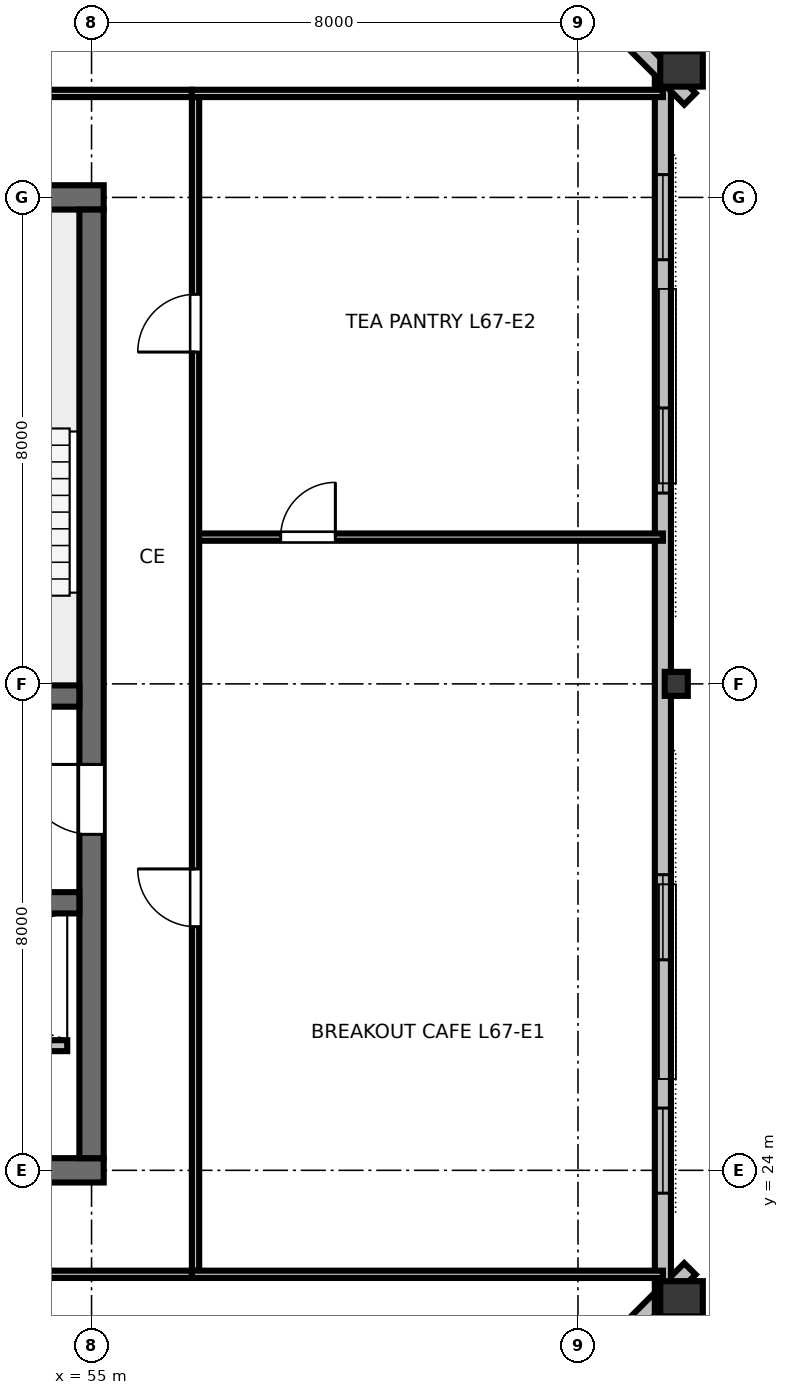
"""IFC4 building model, lengths in metres.
Left out: names, types, materials, properties, quantities, classifications, styles, units other than length and angle.
Written with IfcOpenShell. Run it as: python <this file> out.ifc"""

import sys

from ifc_helpers import new_model, si_unit, direction, frame, frame_2d, origin, origin_2d, place, context, subcontext, project, spatial, rectangle, hollow_rectangle, i_section, extrude, element, fill, save


model = new_model("IFC4")
c1 = context("Model", 3, precision=1e-05, world=origin(), true_north=direction((0.0, 1.0)))
c2 = subcontext(c1, "Body", "Model", "MODEL_VIEW")
j1 = project(units=[si_unit("LENGTHUNIT", "METRE"), si_unit("PLANEANGLEUNIT", "RADIAN")], contexts=[c1])
p1 = place(None, origin())
s1 = spatial("IfcSite", under=j1, at=p1, CompositionType="ELEMENT")
p2 = place(p1, origin())
s2 = spatial("IfcBuilding", under=s1, at=p2, CompositionType="ELEMENT")
p3 = place(p2, frame((0.0, 0.0, 253.8)))
s3 = spatial("IfcBuildingStorey", under=s2, at=p3, CompositionType="ELEMENT", Elevation=253.8)
p4 = place(p3, frame((36.8, 24.0, 0.0), z_axis=(0.0, 0.0, 1.0), x_axis=(1.0, 0.0, 0.0)))
e1 = element("IfcWall", 1, at=p4, inside=s3, PredefinedType="SHEAR", context=c2, shape_type="SweptSolid", body=[
    extrude(rectangle(XDim=18.4, YDim=0.4, at=frame_2d((9.2, 0.0))), origin(), (0.0, 0.0, 1.0), 3.36),
])
p5 = place(p4, frame((13.4, 0.0, 0.0)))
e2 = element("IfcOpeningElement", 2, at=p5, cuts=e1, PredefinedType="OPENING", context=c2, shape_type="SweptSolid", body=[
    extrude(rectangle(XDim=1.6, YDim=2.15, at=frame_2d((0.8, 1.075))), frame((0.0, 0.21, 0.0), z_axis=(0.0, -1.0, 0.0), x_axis=(1.0, 0.0, 0.0)), (0.0, 0.0, 1.0), 0.42),
])
p6 = place(p3, frame((36.8, 40.0, 0.0), z_axis=(0.0, 0.0, 1.0), x_axis=(1.0, 0.0, 0.0)))
e3 = element("IfcWall", 3, at=p6, inside=s3, PredefinedType="SHEAR", context=c2, shape_type="SweptSolid", body=[
    extrude(rectangle(XDim=18.4, YDim=0.4, at=frame_2d((9.2, 0.0))), origin(), (0.0, 0.0, 1.0), 3.36),
])
p7 = place(p6, frame((8.7, 0.0, 0.0)))
e4 = element("IfcOpeningElement", 4, at=p7, cuts=e3, PredefinedType="OPENING", context=c2, shape_type="SweptSolid", body=[
    extrude(rectangle(XDim=1.0, YDim=2.15, at=frame_2d((0.5, 1.075))), frame((0.0, 0.21, 0.0), z_axis=(0.0, -1.0, 0.0), x_axis=(1.0, 0.0, 0.0)), (0.0, 0.0, 1.0), 0.42),
])
p8 = place(p3, frame((55.0, 24.2, 0.0), z_axis=(0.0, 0.0, 1.0), x_axis=(0.0, 1.0, 0.0)))
e5 = element("IfcWall", 5, at=p8, inside=s3, PredefinedType="SHEAR", context=c2, shape_type="SweptSolid", body=[
    extrude(rectangle(XDim=15.6, YDim=0.4, at=frame_2d((7.8, 0.0))), origin(), (0.0, 0.0, 1.0), 3.36),
])
p9 = place(p8, frame((5.325, 0.0, 0.0)))
e6 = element("IfcOpeningElement", 6, at=p9, cuts=e5, PredefinedType="OPENING", context=c2, shape_type="SweptSolid", body=[
    extrude(rectangle(XDim=1.15, YDim=2.15, at=frame_2d((0.575, 1.075))), frame((0.0, 0.21, 0.0), z_axis=(0.0, -1.0, 0.0), x_axis=(1.0, 0.0, 0.0)), (0.0, 0.0, 1.0), 0.42),
])
p10 = place(p3, frame((37.2, 31.8, 0.0), z_axis=(0.0, 0.0, 1.0), x_axis=(1.0, 0.0, 0.0)))
e7 = element("IfcWall", 7, at=p10, inside=s3, PredefinedType="SHEAR", context=c2, shape_type="SweptSolid", body=[
    extrude(rectangle(XDim=17.6, YDim=0.35, at=frame_2d((8.8, 0.0))), origin(), (0.0, 0.0, 1.0), 3.36),
])
p11 = place(p10, frame((0.85, 0.0, 0.0)))
e8 = element("IfcOpeningElement", 8, at=p11, cuts=e7, PredefinedType="OPENING", context=c2, shape_type="SweptSolid", body=[
    extrude(rectangle(XDim=1.1, YDim=2.15, at=frame_2d((0.55, 1.075))), frame((0.0, 0.185, 0.0), z_axis=(0.0, -1.0, 0.0), x_axis=(1.0, 0.0, 0.0)), (0.0, 0.0, 1.0), 0.37),
])
p12 = place(p10, frame((14.75, 0.0, 0.0)))
e9 = element("IfcOpeningElement", 9, at=p12, cuts=e7, PredefinedType="OPENING", context=c2, shape_type="SweptSolid", body=[
    extrude(rectangle(XDim=1.1, YDim=2.15, at=frame_2d((0.55, 1.075))), frame((0.0, 0.185, 0.0), z_axis=(0.0, -1.0, 0.0), x_axis=(1.0, 0.0, 0.0)), (0.0, 0.0, 1.0), 0.37),
])
p13 = place(p3, frame((37.2, 28.4, 0.0), z_axis=(0.0, 0.0, 1.0), x_axis=(1.0, 0.0, 0.0)))
e10 = element("IfcWall", 10, at=p13, inside=s3, PredefinedType="SHEAR", context=c2, shape_type="SweptSolid", body=[
    extrude(rectangle(XDim=17.6, YDim=0.35, at=frame_2d((8.8, 0.0))), origin(), (0.0, 0.0, 1.0), 3.36),
])
p14 = place(p3, frame((64.703, 21.888, 0.0), z_axis=(0.0, 0.0, 1.0), x_axis=(0.0, 1.0, 0.0)))
e11 = element("IfcColumn", 11, at=p14, inside=s3, PredefinedType="COLUMN", context=c2, shape_type="SweptSolid", body=[
    extrude(hollow_rectangle(XDim=0.58, YDim=0.7, WallThickness=0.032, at=origin_2d()), origin(), (0.0, 0.0, 1.0), 3.373),
])
p15 = place(p3, frame((64.616, 32.0, 0.0), z_axis=(0.0, 0.0, 1.0), x_axis=(0.0, 1.0, 0.0)))
e12 = element("IfcColumn", 12, at=p15, inside=s3, PredefinedType="COLUMN", context=c2, shape_type="SweptSolid", body=[
    extrude(i_section(OverallWidth=0.395, OverallDepth=0.38, WebThickness=0.019, FlangeThickness=0.03, FilletRadius=0.025, at=origin_2d()), origin(), (0.0, 0.0, 1.0), 3.373),
])
p16 = place(p3, frame((64.703, 42.112, 0.0), z_axis=(0.0, 0.0, 1.0), x_axis=(0.0, 1.0, 0.0)))
e13 = element("IfcColumn", 13, at=p16, inside=s3, PredefinedType="COLUMN", context=c2, shape_type="SweptSolid", body=[
    extrude(hollow_rectangle(XDim=0.58, YDim=0.7, WallThickness=0.032, at=origin_2d()), origin(), (0.0, 0.0, 1.0), 3.373),
])
p17 = place(p3, frame((57.193, 14.731, 0.0), z_axis=(0.0, 0.0, 1.0), x_axis=(0.707106781187, 0.707106781187, 0.0)))
e14 = element("IfcWall", 14, at=p17, inside=s3, PredefinedType="STANDARD", context=c2, shape_type="SweptSolid", body=[
    extrude(rectangle(XDim=10.816, YDim=0.265, at=frame_2d((5.408, 0.0))), origin(), (0.0, 0.0, 1.0), 2.832),
])
p18 = place(p3, frame((64.396, 21.305, 0.0), z_axis=(0.0, 0.0, 1.0), x_axis=(0.0, 1.0, 0.0)))
e15 = element("IfcWall", 15, at=p18, inside=s3, PredefinedType="STANDARD", context=c2, shape_type="SweptSolid", body=[
    extrude(rectangle(XDim=21.389, YDim=0.265, at=frame_2d((10.695, 0.0))), origin(), (0.0, 0.0, 1.0), 2.832),
])
p19 = place(p18, frame((2.319, 0.0, 0.85)))
e16 = element("IfcOpeningElement", 16, at=p19, cuts=e15, PredefinedType="OPENING", context=c2, shape_type="SweptSolid", body=[
    extrude(rectangle(XDim=1.4, YDim=1.2, at=frame_2d((0.7, 0.6))), frame((0.0, 0.142, 0.0), z_axis=(0.0, -1.0, 0.0), x_axis=(1.0, 0.0, 0.0)), (0.0, 0.0, 1.0), 0.285),
])
p20 = place(p18, frame((6.157, 0.0, 0.85)))
e17 = element("IfcOpeningElement", 17, at=p20, cuts=e15, PredefinedType="OPENING", context=c2, shape_type="SweptSolid", body=[
    extrude(rectangle(XDim=1.4, YDim=1.2, at=frame_2d((0.7, 0.6))), frame((0.0, 0.142, 0.0), z_axis=(0.0, -1.0, 0.0), x_axis=(1.0, 0.0, 0.0)), (0.0, 0.0, 1.0), 0.285),
])
p21 = place(p18, frame((13.832, 0.0, 0.85)))
e18 = element("IfcOpeningElement", 18, at=p21, cuts=e15, PredefinedType="OPENING", context=c2, shape_type="SweptSolid", body=[
    extrude(rectangle(XDim=1.4, YDim=1.2, at=frame_2d((0.7, 0.6))), frame((0.0, 0.142, 0.0), z_axis=(0.0, -1.0, 0.0), x_axis=(1.0, 0.0, 0.0)), (0.0, 0.0, 1.0), 0.285),
])
p22 = place(p18, frame((17.67, 0.0, 0.85)))
e19 = element("IfcOpeningElement", 19, at=p22, cuts=e15, PredefinedType="OPENING", context=c2, shape_type="SweptSolid", body=[
    extrude(rectangle(XDim=1.4, YDim=1.2, at=frame_2d((0.7, 0.6))), frame((0.0, 0.142, 0.0), z_axis=(0.0, -1.0, 0.0), x_axis=(1.0, 0.0, 0.0)), (0.0, 0.0, 1.0), 0.285),
])
p23 = place(p3, frame((64.841, 41.62, 0.0), z_axis=(0.0, 0.0, 1.0), x_axis=(-0.707106781187, 0.707106781187, 0.0)))
e20 = element("IfcWall", 20, at=p23, inside=s3, PredefinedType="STANDARD", context=c2, shape_type="SweptSolid", body=[
    extrude(rectangle(XDim=10.816, YDim=0.265, at=frame_2d((5.408, 0.0))), origin(), (0.0, 0.0, 1.0), 2.832),
])
p24 = place(p3, frame((47.6, 26.05, 0.0), z_axis=(0.0, 0.0, 1.0), x_axis=(1.0, 0.0, 0.0)))
e21 = element("IfcWall", 21, at=p24, inside=s3, PredefinedType="PARTITIONING", context=c2, shape_type="SweptSolid", body=[
    extrude(rectangle(XDim=7.0, YDim=0.18, at=frame_2d((3.5, 0.0))), origin(), (0.0, 0.0, 1.0), 3.375),
])
p25 = place(p24, frame((1.2, 0.0, 0.0)))
e22 = element("IfcOpeningElement", 22, at=p25, cuts=e21, PredefinedType="OPENING", context=c2, shape_type="SweptSolid", body=[
    extrude(rectangle(XDim=1.05, YDim=2.15, at=frame_2d((0.525, 1.075))), frame((0.0, 0.1, 0.0), z_axis=(0.0, -1.0, 0.0), x_axis=(1.0, 0.0, 0.0)), (0.0, 0.0, 1.0), 0.2),
])
p26 = place(p24, frame((3.4, 0.0, 0.0)))
e23 = element("IfcOpeningElement", 23, at=p26, cuts=e21, PredefinedType="OPENING", context=c2, shape_type="SweptSolid", body=[
    extrude(rectangle(XDim=1.05, YDim=2.15, at=frame_2d((0.525, 1.075))), frame((0.0, 0.1, 0.0), z_axis=(0.0, -1.0, 0.0), x_axis=(1.0, 0.0, 0.0)), (0.0, 0.0, 1.0), 0.2),
])
p27 = place(p3, frame((46.72, 22.29, 0.0), z_axis=(0.0, 0.0, 1.0), x_axis=(1.0, 0.0, 0.0)))
e24 = element("IfcWall", 24, at=p27, inside=s3, PredefinedType="PARTITIONING", context=c2, shape_type="SweptSolid", body=[
    extrude(rectangle(XDim=9.93, YDim=0.12, at=frame_2d((4.965, 0.0))), origin(), (0.0, 0.0, 1.0), 2.655),
])
p28 = place(p27, frame((4.555, 0.0, 0.0)))
e25 = element("IfcOpeningElement", 25, at=p28, cuts=e24, PredefinedType="OPENING", context=c2, shape_type="SweptSolid", body=[
    extrude(rectangle(XDim=0.95, YDim=2.15, at=frame_2d((0.475, 1.075))), frame((0.0, 0.07, 0.0), z_axis=(0.0, -1.0, 0.0), x_axis=(1.0, 0.0, 0.0)), (0.0, 0.0, 1.0), 0.14),
])
p29 = place(p3, frame((35.35, 41.71, 0.0), z_axis=(0.0, 0.0, 1.0), x_axis=(1.0, 0.0, 0.0)))
e26 = element("IfcWall", 26, at=p29, inside=s3, PredefinedType="PARTITIONING", context=c2, shape_type="SweptSolid", body=[
    extrude(rectangle(XDim=21.3, YDim=0.12, at=frame_2d((10.65, 0.0))), origin(), (0.0, 0.0, 1.0), 2.655),
])
p30 = place(p29, frame((3.472, 0.0, 0.0)))
e27 = element("IfcOpeningElement", 27, at=p30, cuts=e26, PredefinedType="OPENING", context=c2, shape_type="SweptSolid", body=[
    extrude(rectangle(XDim=0.95, YDim=2.15, at=frame_2d((0.475, 1.075))), frame((0.0, 0.07, 0.0), z_axis=(0.0, -1.0, 0.0), x_axis=(1.0, 0.0, 0.0)), (0.0, 0.0, 1.0), 0.14),
])
p31 = place(p29, frame((12.975, 0.0, 0.0)))
e28 = element("IfcOpeningElement", 28, at=p31, cuts=e26, PredefinedType="OPENING", context=c2, shape_type="SweptSolid", body=[
    extrude(rectangle(XDim=0.95, YDim=2.15, at=frame_2d((0.475, 1.075))), frame((0.0, 0.07, 0.0), z_axis=(0.0, -1.0, 0.0), x_axis=(1.0, 0.0, 0.0)), (0.0, 0.0, 1.0), 0.14),
])
p32 = place(p29, frame((17.735, 0.0, 0.0)))
e29 = element("IfcOpeningElement", 29, at=p32, cuts=e26, PredefinedType="OPENING", context=c2, shape_type="SweptSolid", body=[
    extrude(rectangle(XDim=0.95, YDim=2.15, at=frame_2d((0.475, 1.075))), frame((0.0, 0.07, 0.0), z_axis=(0.0, -1.0, 0.0), x_axis=(1.0, 0.0, 0.0)), (0.0, 0.0, 1.0), 0.14),
])
p33 = place(p3, frame((56.71, 34.413, 0.0), z_axis=(0.0, 0.0, 1.0), x_axis=(1.0, 0.0, 0.0)))
e30 = element("IfcWall", 30, at=p33, inside=s3, PredefinedType="PARTITIONING", context=c2, shape_type="SweptSolid", body=[
    extrude(rectangle(XDim=7.687, YDim=0.12, at=frame_2d((3.843, 0.0))), origin(), (0.0, 0.0, 1.0), 2.655),
])
p34 = place(p33, frame((1.4, 0.0, 0.0)))
e31 = element("IfcOpeningElement", 31, at=p34, cuts=e30, PredefinedType="OPENING", context=c2, shape_type="SweptSolid", body=[
    extrude(rectangle(XDim=0.9, YDim=2.15, at=frame_2d((0.45, 1.075))), frame((0.0, 0.07, 0.0), z_axis=(0.0, -1.0, 0.0), x_axis=(1.0, 0.0, 0.0)), (0.0, 0.0, 1.0), 0.14),
])
p35 = place(p3, frame((56.71, 22.35, 0.0), z_axis=(0.0, 0.0, 1.0), x_axis=(0.0, 1.0, 0.0)))
e32 = element("IfcWall", 32, at=p35, inside=s3, PredefinedType="PARTITIONING", context=c2, shape_type="SweptSolid", body=[
    extrude(rectangle(XDim=19.3, YDim=0.12, at=frame_2d((9.65, 0.0))), origin(), (0.0, 0.0, 1.0), 2.655),
])
p36 = place(p35, frame((5.657, 0.0, 0.0)))
e33 = element("IfcOpeningElement", 33, at=p36, cuts=e32, PredefinedType="OPENING", context=c2, shape_type="SweptSolid", body=[
    extrude(rectangle(XDim=0.95, YDim=2.15, at=frame_2d((0.475, 1.075))), frame((0.0, 0.07, 0.0), z_axis=(0.0, -1.0, 0.0), x_axis=(1.0, 0.0, 0.0)), (0.0, 0.0, 1.0), 0.14),
])
p37 = place(p35, frame((15.107, 0.0, 0.0)))
e34 = element("IfcOpeningElement", 34, at=p37, cuts=e32, PredefinedType="OPENING", context=c2, shape_type="SweptSolid", body=[
    extrude(rectangle(XDim=0.95, YDim=2.15, at=frame_2d((0.475, 1.075))), frame((0.0, 0.07, 0.0), z_axis=(0.0, -1.0, 0.0), x_axis=(1.0, 0.0, 0.0)), (0.0, 0.0, 1.0), 0.14),
])
for number, where, z_axis, x_axis in (
    (35, (56.65, 22.29, 0.0), (0.0, 0.0, 1.0), (1.0, 0.0, 0.0)),
    (36, (56.65, 41.71, 0.0), (0.0, 0.0, 1.0), (1.0, 0.0, 0.0)),
):
    element("IfcWall", number, at=place(p3, frame(where, z_axis=z_axis, x_axis=x_axis)), inside=s3, PredefinedType="PARTITIONING", context=c2, shape_type="SweptSolid", body=[
        extrude(rectangle(XDim=7.747, YDim=0.12, at=frame_2d((3.873, 0.0))), origin(), (0.0, 0.0, 1.0), 2.655),
    ])
p38 = place(p19, origin())
e37 = element("IfcWindow", 37, at=p38, inside=s3, PartitioningType="SINGLE_PANEL", PredefinedType="WINDOW", context=c2, shape_type="SweptSolid", body=[
    extrude(rectangle(XDim=1.4, YDim=1.2, at=frame_2d((0.7, 0.6))), frame((0.0, 0.03, 0.0), z_axis=(0.0, -1.0, 0.0), x_axis=(1.0, 0.0, 0.0)), (0.0, 0.0, 1.0), 0.06),
])
fill(e16, e37)
p39 = place(p20, origin())
e38 = element("IfcWindow", 38, at=p39, inside=s3, PartitioningType="SINGLE_PANEL", PredefinedType="WINDOW", context=c2, shape_type="SweptSolid", body=[
    extrude(rectangle(XDim=1.4, YDim=1.2, at=frame_2d((0.7, 0.6))), frame((0.0, 0.03, 0.0), z_axis=(0.0, -1.0, 0.0), x_axis=(1.0, 0.0, 0.0)), (0.0, 0.0, 1.0), 0.06),
])
fill(e17, e38)
p40 = place(p21, origin())
e39 = element("IfcWindow", 39, at=p40, inside=s3, PartitioningType="SINGLE_PANEL", PredefinedType="WINDOW", context=c2, shape_type="SweptSolid", body=[
    extrude(rectangle(XDim=1.4, YDim=1.2, at=frame_2d((0.7, 0.6))), frame((0.0, 0.03, 0.0), z_axis=(0.0, -1.0, 0.0), x_axis=(1.0, 0.0, 0.0)), (0.0, 0.0, 1.0), 0.06),
])
fill(e18, e39)
p41 = place(p22, origin())
e40 = element("IfcWindow", 40, at=p41, inside=s3, PartitioningType="SINGLE_PANEL", PredefinedType="WINDOW", context=c2, shape_type="SweptSolid", body=[
    extrude(rectangle(XDim=1.4, YDim=1.2, at=frame_2d((0.7, 0.6))), frame((0.0, 0.03, 0.0), z_axis=(0.0, -1.0, 0.0), x_axis=(1.0, 0.0, 0.0)), (0.0, 0.0, 1.0), 0.06),
])
fill(e19, e40)
p42 = place(p9, origin())
e41 = element("IfcDoor", 41, at=p42, inside=s3, OperationType="SINGLE_SWING_RIGHT", PredefinedType="DOOR", context=c2, shape_type="SweptSolid", body=[
    extrude(rectangle(XDim=1.15, YDim=2.15, at=frame_2d((0.575, 1.075))), frame((0.0, 0.025, 0.0), z_axis=(0.0, -1.0, 0.0), x_axis=(1.0, 0.0, 0.0)), (0.0, 0.0, 1.0), 0.05),
])
fill(e6, e41)
p43 = place(p34, origin())
e42 = element("IfcDoor", 42, at=p43, inside=s3, OperationType="SINGLE_SWING_RIGHT", PredefinedType="DOOR", context=c2, shape_type="SweptSolid", body=[
    extrude(rectangle(XDim=0.9, YDim=2.15, at=frame_2d((0.45, 1.075))), frame((0.0, 0.025, 0.0), z_axis=(0.0, -1.0, 0.0), x_axis=(1.0, 0.0, 0.0)), (0.0, 0.0, 1.0), 0.05),
])
fill(e31, e42)
p44 = place(p36, origin())
e43 = element("IfcDoor", 43, at=p44, inside=s3, OperationType="SINGLE_SWING_RIGHT", PredefinedType="DOOR", context=c2, shape_type="SweptSolid", body=[
    extrude(rectangle(XDim=0.95, YDim=2.15, at=frame_2d((0.475, 1.075))), frame((0.0, 0.025, 0.0), z_axis=(0.0, -1.0, 0.0), x_axis=(1.0, 0.0, 0.0)), (0.0, 0.0, 1.0), 0.05),
])
fill(e33, e43)
p45 = place(p37, origin())
e44 = element("IfcDoor", 44, at=p45, inside=s3, OperationType="SINGLE_SWING_LEFT", PredefinedType="DOOR", context=c2, shape_type="SweptSolid", body=[
    extrude(rectangle(XDim=0.95, YDim=2.15, at=frame_2d((0.475, 1.075))), frame((0.0, 0.025, 0.0), z_axis=(0.0, -1.0, 0.0), x_axis=(1.0, 0.0, 0.0)), (0.0, 0.0, 1.0), 0.05),
])
fill(e34, e44)
save(model, sys.argv[1])
